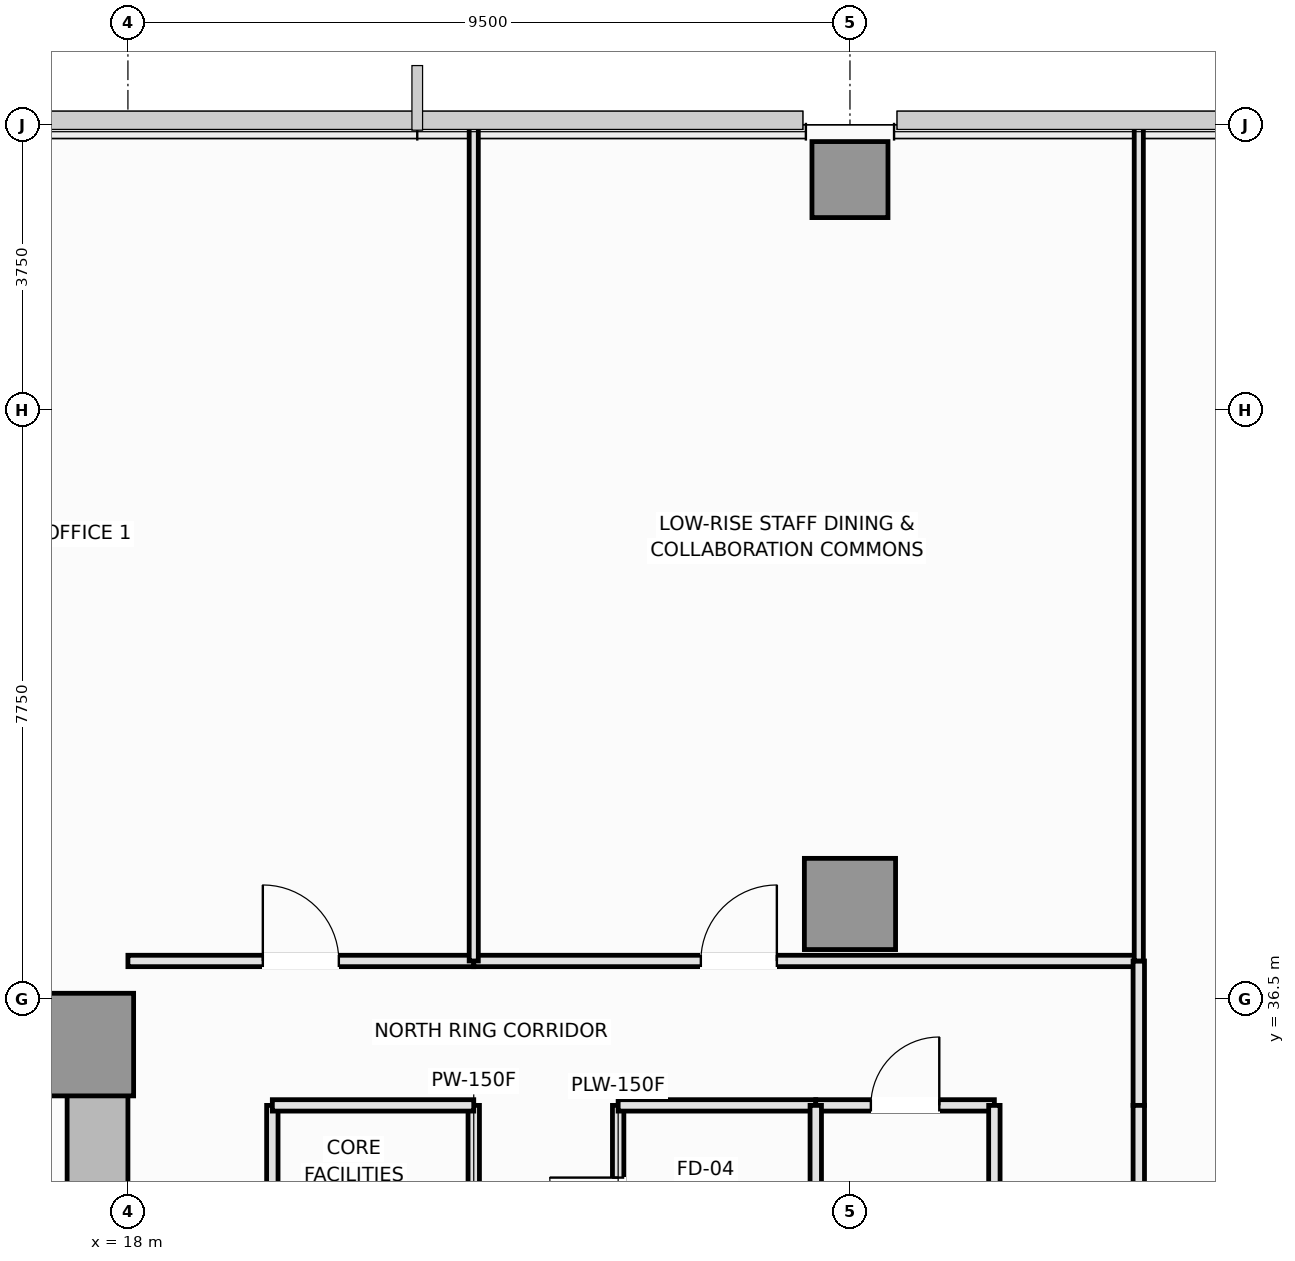
"""IFC4 building model, lengths in metres.
Left out: names, types, materials, properties, quantities, classifications, styles, units other than length and angle.
Written with IfcOpenShell. Run it as: python <this file> out.ifc"""

import sys

from ifc_helpers import new_model, si_unit, direction, frame, frame_2d, origin, origin_2d, place, context, subcontext, project, spatial, rectangle, extrude, element, fill, save


model = new_model("IFC4")
c1 = context("Model", 3, precision=1e-05, world=origin(), true_north=direction((0.0, 1.0)))
c2 = subcontext(c1, "Body", "Model", "MODEL_VIEW")
j1 = project(units=[si_unit("LENGTHUNIT", "METRE"), si_unit("PLANEANGLEUNIT", "RADIAN")], contexts=[c1])
p1 = place(None, origin())
s1 = spatial("IfcSite", under=j1, at=p1, CompositionType="ELEMENT")
p2 = place(p1, origin())
s2 = spatial("IfcBuilding", under=s1, at=p2, CompositionType="ELEMENT")
p3 = place(p2, frame((0.0, 0.0, 85.95)))
s3 = spatial("IfcBuildingStorey", under=s2, at=p3, CompositionType="ELEMENT", Elevation=85.95)
p4 = place(p3, frame((4.5, 36.1, 0.0), z_axis=(0.0, 0.0, 1.0), x_axis=(1.0, 0.0, 0.0)))
e1 = element("IfcWall", 1, at=p4, inside=s3, PredefinedType="SHEAR", context=c2, shape_type="SweptSolid", body=[
    extrude(rectangle(XDim=13.5, YDim=0.8, at=frame_2d((6.75, 0.0))), origin(), (0.0, 0.0, 1.0), 3.55),
])
p5 = place(p3, frame((17.6, 27.05, 0.0), z_axis=(0.0, 0.0, 1.0), x_axis=(0.0, 1.0, 0.0)))
e2 = element("IfcWall", 2, at=p5, inside=s3, PredefinedType="SHEAR", context=c2, shape_type="SweptSolid", body=[
    extrude(rectangle(XDim=8.65, YDim=0.8, at=frame_2d((4.325, 0.0))), origin(), (0.0, 0.0, 1.0), 3.55),
])
p6 = place(p5, frame((3.45, 0.0, 0.0)))
e3 = element("IfcOpeningElement", 3, at=p6, cuts=e2, PredefinedType="OPENING", context=c2, shape_type="SweptSolid", body=[
    extrude(rectangle(XDim=1.1, YDim=2.15, at=frame_2d((0.55, 1.075))), frame((0.0, 0.41, 0.0), z_axis=(0.0, -1.0, 0.0), x_axis=(1.0, 0.0, 0.0)), (0.0, 0.0, 1.0), 0.82),
])
p7 = place(p3, frame((17.4, 35.9, 0.0), z_axis=(0.0, 0.0, 1.0), x_axis=(1.0, 0.0, 0.0)))
e4 = element("IfcColumn", 4, at=p7, inside=s3, PredefinedType="PILASTER", context=c2, shape_type="SweptSolid", body=[
    extrude(rectangle(XDim=1.35, YDim=1.35, at=origin_2d()), origin(), (0.0, 0.0, 1.0), 3.55),
])
p8 = place(p3, frame((27.5, 37.75, 0.0), z_axis=(0.0, 0.0, 1.0), x_axis=(1.0, 0.0, 0.0)))
e5 = element("IfcColumn", 5, at=p8, inside=s3, PredefinedType="COLUMN", context=c2, shape_type="SweptSolid", body=[
    extrude(rectangle(XDim=1.2, YDim=1.2, at=origin_2d()), origin(), (0.0, 0.0, 1.0), 3.55),
])
p9 = place(p3, frame((27.5, 47.28, 0.0), z_axis=(0.0, 0.0, 1.0), x_axis=(1.0, 0.0, 0.0)))
e6 = element("IfcColumn", 6, at=p9, inside=s3, PredefinedType="COLUMN", context=c2, shape_type="SweptSolid", body=[
    extrude(rectangle(XDim=1.0, YDim=1.0, at=origin_2d()), origin(), (0.0, 0.0, 1.0), 3.55),
])
p10 = place(p3, frame((22.55, 29.75, 0.0), z_axis=(0.0, 0.0, 1.0), x_axis=(0.0, 1.0, 0.0)))
e7 = element("IfcWall", 7, at=p10, inside=s3, PredefinedType="PARTITIONING", context=c2, shape_type="SweptSolid", body=[
    extrude(rectangle(XDim=5.35, YDim=0.15, at=frame_2d((2.675, 0.0))), origin(), (0.0, 0.0, 1.0), 3.01),
])
p11 = place(p10, frame((2.175, 0.0, 0.0)))
e8 = element("IfcOpeningElement", 8, at=p11, cuts=e7, PredefinedType="OPENING", context=c2, shape_type="SweptSolid", body=[
    extrude(rectangle(XDim=1.0, YDim=2.15, at=frame_2d((0.5, 1.075))), frame((0.0, 0.085, 0.0), z_axis=(0.0, -1.0, 0.0), x_axis=(1.0, 0.0, 0.0)), (0.0, 0.0, 1.0), 0.17),
])
p12 = place(p3, frame((24.45, 32.3, 0.0), z_axis=(0.0, 0.0, 1.0), x_axis=(0.0, 1.0, 0.0)))
e9 = element("IfcWall", 9, at=p12, inside=s3, PredefinedType="PLUMBINGWALL", context=c2, shape_type="SweptSolid", body=[
    extrude(rectangle(XDim=2.8, YDim=0.15, at=frame_2d((1.4, 0.0))), origin(), (0.0, 0.0, 1.0), 3.37),
])
p13 = place(p12, frame((0.95, 0.0, 0.0)))
e10 = element("IfcOpeningElement", 10, at=p13, cuts=e9, PredefinedType="OPENING", context=c2, shape_type="SweptSolid", body=[
    extrude(rectangle(XDim=0.9, YDim=2.1, at=frame_2d((0.45, 1.05))), frame((0.0, 0.085, 0.0), z_axis=(0.0, -1.0, 0.0), x_axis=(1.0, 0.0, 0.0)), (0.0, 0.0, 1.0), 0.17),
])
p14 = place(p3, frame((19.9, 29.75, 0.0), z_axis=(0.0, 0.0, 1.0), x_axis=(0.0, 1.0, 0.0)))
e11 = element("IfcWall", 11, at=p14, inside=s3, PredefinedType="PARTITIONING", context=c2, shape_type="SweptSolid", body=[
    extrude(rectangle(XDim=5.35, YDim=0.15, at=frame_2d((2.675, 0.0))), origin(), (0.0, 0.0, 1.0), 3.37),
])
p15 = place(p3, frame((19.9, 35.1, 0.0), z_axis=(0.0, 0.0, 1.0), x_axis=(1.0, 0.0, 0.0)))
e12 = element("IfcWall", 12, at=p15, inside=s3, PredefinedType="PARTITIONING", context=c2, shape_type="SweptSolid", body=[
    extrude(rectangle(XDim=2.65, YDim=0.15, at=frame_2d((1.325, 0.0))), origin(), (0.0, 0.0, 1.0), 3.37),
])
p16 = place(p3, frame((24.45, 35.1, 0.0), z_axis=(0.0, 0.0, 1.0), x_axis=(1.0, 0.0, 0.0)))
e13 = element("IfcWall", 13, at=p16, inside=s3, PredefinedType="PLUMBINGWALL", context=c2, shape_type="SweptSolid", body=[
    extrude(rectangle(XDim=2.6, YDim=0.15, at=frame_2d((1.3, 0.0))), origin(), (0.0, 0.0, 1.0), 3.37),
])
p17 = place(p3, frame((27.05, 35.1, 0.0), z_axis=(0.0, 0.0, 1.0), x_axis=(1.0, 0.0, 0.0)))
e14 = element("IfcWall", 14, at=p17, inside=s3, PredefinedType="PLUMBINGWALL", context=c2, shape_type="SweptSolid", body=[
    extrude(rectangle(XDim=2.35, YDim=0.15, at=frame_2d((1.175, 0.0))), origin(), (0.0, 0.0, 1.0), 3.37),
])
p18 = place(p17, frame((0.725, 0.0, 0.0)))
e15 = element("IfcOpeningElement", 15, at=p18, cuts=e14, PredefinedType="OPENING", context=c2, shape_type="SweptSolid", body=[
    extrude(rectangle(XDim=0.9, YDim=2.1, at=frame_2d((0.45, 1.05))), frame((0.0, 0.085, 0.0), z_axis=(0.0, -1.0, 0.0), x_axis=(1.0, 0.0, 0.0)), (0.0, 0.0, 1.0), 0.17),
])
p19 = place(p3, frame((18.0, 37.0, 0.0), z_axis=(0.0, 0.0, 1.0), x_axis=(1.0, 0.0, 0.0)))
e16 = element("IfcWall", 16, at=p19, inside=s3, PredefinedType="PARTITIONING", context=c2, shape_type="SweptSolid", body=[
    extrude(rectangle(XDim=4.55, YDim=0.15, at=frame_2d((2.275, 0.0))), origin(), (0.0, 0.0, 1.0), 3.37),
])
p20 = place(p19, frame((1.775, 0.0, 0.0)))
e17 = element("IfcOpeningElement", 17, at=p20, cuts=e16, PredefinedType="OPENING", context=c2, shape_type="SweptSolid", body=[
    extrude(rectangle(XDim=1.0, YDim=2.15, at=frame_2d((0.5, 1.075))), frame((0.0, 0.085, 0.0), z_axis=(0.0, -1.0, 0.0), x_axis=(1.0, 0.0, 0.0)), (0.0, 0.0, 1.0), 0.17),
])
p21 = place(p3, frame((22.55, 37.0, 0.0), z_axis=(0.0, 0.0, 1.0), x_axis=(1.0, 0.0, 0.0)))
e18 = element("IfcWall", 18, at=p21, inside=s3, PredefinedType="PARTITIONING", context=c2, shape_type="SweptSolid", body=[
    extrude(rectangle(XDim=8.75, YDim=0.15, at=frame_2d((4.375, 0.0))), origin(), (0.0, 0.0, 1.0), 3.37),
])
p22 = place(p21, frame((2.988, 0.0, 0.0)))
e19 = element("IfcOpeningElement", 19, at=p22, cuts=e18, PredefinedType="OPENING", context=c2, shape_type="SweptSolid", body=[
    extrude(rectangle(XDim=1.0, YDim=2.15, at=frame_2d((0.5, 1.075))), frame((0.0, 0.085, 0.0), z_axis=(0.0, -1.0, 0.0), x_axis=(1.0, 0.0, 0.0)), (0.0, 0.0, 1.0), 0.17),
])
p23 = place(p3, frame((31.3, 35.1, 0.0), z_axis=(0.0, 0.0, 1.0), x_axis=(0.0, 1.0, 0.0)))
e20 = element("IfcWall", 20, at=p23, inside=s3, PredefinedType="PARTITIONING", context=c2, shape_type="SweptSolid", body=[
    extrude(rectangle(XDim=1.9, YDim=0.15, at=frame_2d((0.95, 0.0))), origin(), (0.0, 0.0, 1.0), 3.37),
])
p24 = place(p3, frame((29.4, 32.3, 0.0), z_axis=(0.0, 0.0, 1.0), x_axis=(0.0, 1.0, 0.0)))
e21 = element("IfcWall", 21, at=p24, inside=s3, PredefinedType="PLUMBINGWALL", context=c2, shape_type="SweptSolid", body=[
    extrude(rectangle(XDim=2.8, YDim=0.15, at=frame_2d((1.4, 0.0))), origin(), (0.0, 0.0, 1.0), 3.37),
])
p25 = place(p3, frame((31.3, 18.5, 0.0), z_axis=(0.0, 0.0, 1.0), x_axis=(0.0, 1.0, 0.0)))
e22 = element("IfcWall", 22, at=p25, inside=s3, PredefinedType="PARTITIONING", context=c2, shape_type="SweptSolid", body=[
    extrude(rectangle(XDim=16.6, YDim=0.15, at=frame_2d((8.3, 0.0))), origin(), (0.0, 0.0, 1.0), 3.37),
])
p26 = place(p25, frame((7.4, 0.0, 0.0)))
e23 = element("IfcOpeningElement", 23, at=p26, cuts=e22, PredefinedType="OPENING", context=c2, shape_type="SweptSolid", body=[
    extrude(rectangle(XDim=1.8, YDim=2.2, at=frame_2d((0.9, 1.1))), frame((0.0, 0.085, 0.0), z_axis=(0.0, -1.0, 0.0), x_axis=(1.0, 0.0, 0.0)), (0.0, 0.0, 1.0), 0.17),
])
p27 = place(p3, frame((27.05, 32.3, 0.0), z_axis=(0.0, 0.0, 1.0), x_axis=(0.0, 1.0, 0.0)))
e24 = element("IfcWall", 24, at=p27, inside=s3, PredefinedType="PLUMBINGWALL", context=c2, shape_type="SweptSolid", body=[
    extrude(rectangle(XDim=2.8, YDim=0.15, at=frame_2d((1.4, 0.0))), origin(), (0.0, 0.0, 1.0), 3.37),
])
p28 = place(p3, frame((22.55, 37.0, 0.0), z_axis=(0.0, 0.0, 1.0), x_axis=(0.0, 1.0, 0.0)))
e25 = element("IfcWall", 25, at=p28, inside=s3, PredefinedType="PARTITIONING", context=c2, shape_type="SweptSolid", body=[
    extrude(rectangle(XDim=10.99, YDim=0.12, at=frame_2d((5.495, 0.0))), origin(), (0.0, 0.0, 1.0), 3.01),
])
p29 = place(p3, frame((31.3, 37.0, 0.0), z_axis=(0.0, 0.0, 1.0), x_axis=(0.0, 1.0, 0.0)))
e26 = element("IfcWall", 26, at=p29, inside=s3, PredefinedType="PARTITIONING", context=c2, shape_type="SweptSolid", body=[
    extrude(rectangle(XDim=10.99, YDim=0.12, at=frame_2d((5.495, 0.0))), origin(), (0.0, 0.0, 1.0), 3.37),
])
p30 = place(p13, origin())
e27 = element("IfcDoor", 27, at=p30, inside=s3, OperationType="SINGLE_SWING_RIGHT", PredefinedType="DOOR", context=c2, shape_type="SweptSolid", body=[
    extrude(rectangle(XDim=0.9, YDim=2.1, at=frame_2d((0.45, 1.05))), frame((0.0, 0.025, 0.0), z_axis=(0.0, -1.0, 0.0), x_axis=(1.0, 0.0, 0.0)), (0.0, 0.0, 1.0), 0.05),
])
fill(e10, e27)
p31 = place(p18, origin())
e28 = element("IfcDoor", 28, at=p31, inside=s3, OperationType="SINGLE_SWING_RIGHT", PredefinedType="DOOR", context=c2, shape_type="SweptSolid", body=[
    extrude(rectangle(XDim=0.9, YDim=2.1, at=frame_2d((0.45, 1.05))), frame((0.0, 0.025, 0.0), z_axis=(0.0, -1.0, 0.0), x_axis=(1.0, 0.0, 0.0)), (0.0, 0.0, 1.0), 0.05),
])
fill(e15, e28)
p32 = place(p20, origin())
e29 = element("IfcDoor", 29, at=p32, inside=s3, OperationType="SINGLE_SWING_LEFT", PredefinedType="DOOR", context=c2, shape_type="SweptSolid", body=[
    extrude(rectangle(XDim=1.0, YDim=2.15, at=frame_2d((0.5, 1.075))), frame((0.0, 0.025, 0.0), z_axis=(0.0, -1.0, 0.0), x_axis=(1.0, 0.0, 0.0)), (0.0, 0.0, 1.0), 0.05),
])
fill(e17, e29)
p33 = place(p22, origin())
e30 = element("IfcDoor", 30, at=p33, inside=s3, OperationType="SINGLE_SWING_RIGHT", PredefinedType="DOOR", context=c2, shape_type="SweptSolid", body=[
    extrude(rectangle(XDim=1.0, YDim=2.15, at=frame_2d((0.5, 1.075))), frame((0.0, 0.025, 0.0), z_axis=(0.0, -1.0, 0.0), x_axis=(1.0, 0.0, 0.0)), (0.0, 0.0, 1.0), 0.05),
])
fill(e19, e30)
save(model, sys.argv[1])
